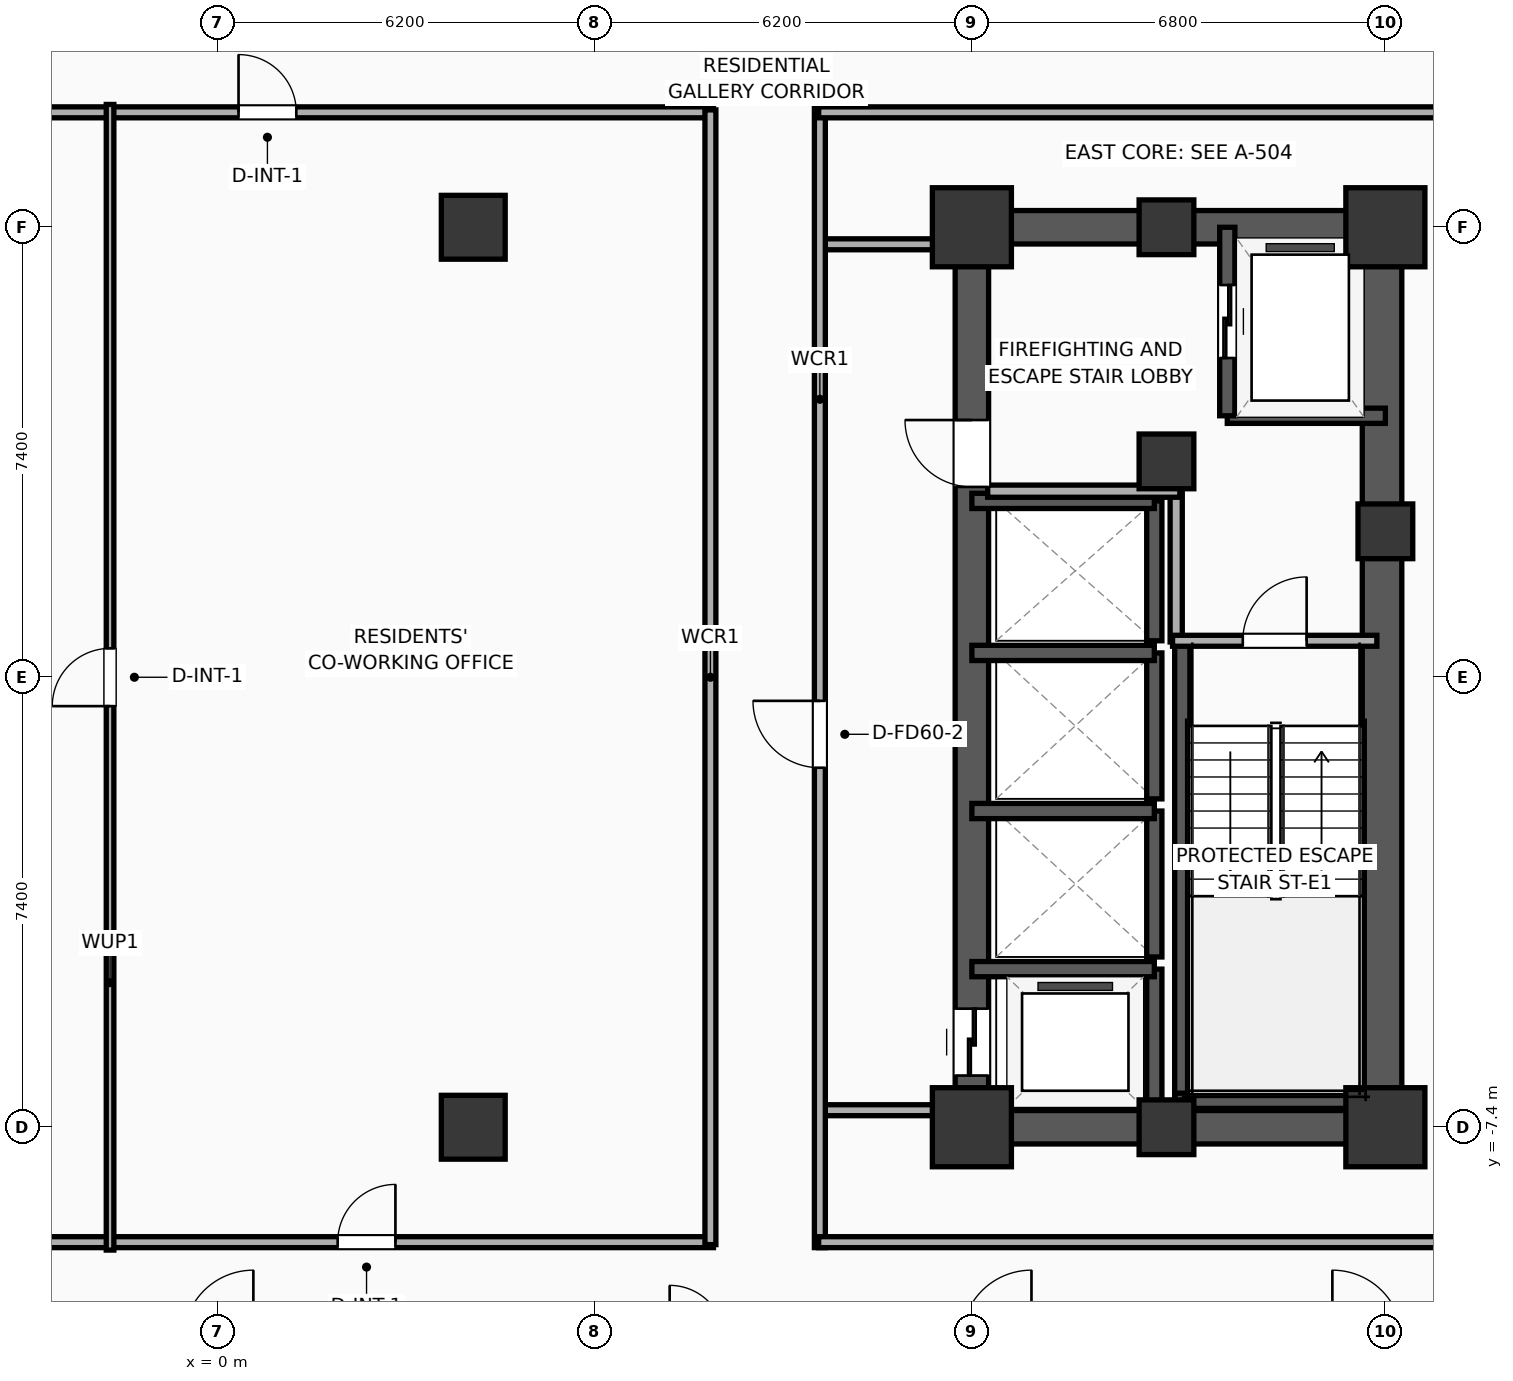
"""IFC4 building model, lengths in metres.
Left out: names, types, materials, properties, quantities, classifications, styles, units other than length and angle.
Written with IfcOpenShell. Run it as: python <this file> out.ifc"""

import sys

from ifc_helpers import new_model, si_unit, direction, frame, frame_2d, origin, origin_2d, place, context, subcontext, project, spatial, rectangle, extrude, element, fill, save


model = new_model("IFC4")
c1 = context("Model", 3, precision=1e-05, world=origin(), true_north=direction((0.0, 1.0)))
c2 = subcontext(c1, "Body", "Model", "MODEL_VIEW")
j1 = project(units=[si_unit("LENGTHUNIT", "METRE"), si_unit("PLANEANGLEUNIT", "RADIAN")], contexts=[c1])
p1 = place(None, origin())
s1 = spatial("IfcSite", under=j1, at=p1, CompositionType="ELEMENT")
p2 = place(p1, origin())
s2 = spatial("IfcBuilding", under=s1, at=p2, CompositionType="ELEMENT")
p3 = place(p2, frame((0.0, 0.0, 89.7)))
s3 = spatial("IfcBuildingStorey", under=s2, at=p3, CompositionType="ELEMENT", Elevation=89.7)
p4 = place(p3, frame((12.4, -7.4, 0.0), z_axis=(0.0, 0.0, 1.0), x_axis=(1.0, 0.0, 0.0)))
e1 = element("IfcColumn", 1, at=p4, inside=s3, PredefinedType="COLUMN", context=c2, shape_type="SweptSolid", body=[
    extrude(rectangle(XDim=1.3, YDim=1.3, at=origin_2d()), origin(), (0.0, 0.0, 1.0), 3.9),
])
p5 = place(p3, frame((15.6, 3.55, 0.0), z_axis=(0.0, 0.0, 1.0), x_axis=(1.0, 0.0, 0.0)))
e2 = element("IfcColumn", 2, at=p5, inside=s3, PredefinedType="COLUMN", context=c2, shape_type="SweptSolid", body=[
    extrude(rectangle(XDim=0.9, YDim=0.9, at=origin_2d()), origin(), (0.0, 0.0, 1.0), 3.9),
])
p6 = place(p3, frame((12.4, 7.4, 0.0), z_axis=(0.0, 0.0, 1.0), x_axis=(1.0, 0.0, 0.0)))
e3 = element("IfcColumn", 3, at=p6, inside=s3, PredefinedType="COLUMN", context=c2, shape_type="SweptSolid", body=[
    extrude(rectangle(XDim=1.3, YDim=1.3, at=origin_2d()), origin(), (0.0, 0.0, 1.0), 3.9),
])
for number, where, z_axis, x_axis in (
    (4, (15.6, -7.4, 0.0), (0.0, 0.0, 1.0), (1.0, 0.0, 0.0)),
    (5, (15.6, 7.4, 0.0), (0.0, 0.0, 1.0), (1.0, 0.0, 0.0)),
):
    element("IfcColumn", number, at=place(p3, frame(where, z_axis=z_axis, x_axis=x_axis)), inside=s3, PredefinedType="COLUMN", context=c2, shape_type="SweptSolid", body=[
        extrude(rectangle(XDim=0.9, YDim=0.9, at=origin_2d()), origin(), (0.0, 0.0, 1.0), 3.9),
    ])
p7 = place(p3, frame((19.2, -7.4, 0.0), z_axis=(0.0, 0.0, 1.0), x_axis=(1.0, 0.0, 0.0)))
e6 = element("IfcColumn", 6, at=p7, inside=s3, PredefinedType="COLUMN", context=c2, shape_type="SweptSolid", body=[
    extrude(rectangle(XDim=1.3, YDim=1.3, at=origin_2d()), origin(), (0.0, 0.0, 1.0), 3.9),
])
p8 = place(p3, frame((19.2, 2.4, 0.0), z_axis=(0.0, 0.0, 1.0), x_axis=(1.0, 0.0, 0.0)))
e7 = element("IfcColumn", 7, at=p8, inside=s3, PredefinedType="COLUMN", context=c2, shape_type="SweptSolid", body=[
    extrude(rectangle(XDim=0.9, YDim=0.9, at=origin_2d()), origin(), (0.0, 0.0, 1.0), 3.9),
])
p9 = place(p3, frame((19.2, 7.4, 0.0), z_axis=(0.0, 0.0, 1.0), x_axis=(1.0, 0.0, 0.0)))
e8 = element("IfcColumn", 8, at=p9, inside=s3, PredefinedType="COLUMN", context=c2, shape_type="SweptSolid", body=[
    extrude(rectangle(XDim=1.3, YDim=1.3, at=origin_2d()), origin(), (0.0, 0.0, 1.0), 3.9),
])
for number, where, z_axis, x_axis in (
    (9, (12.125, -7.4, 0.0), (0.0, 0.0, 1.0), (1.0, 0.0, 0.0)),
    (10, (12.125, 7.4, 0.0), (0.0, 0.0, 1.0), (1.0, 0.0, 0.0)),
):
    element("IfcWall", number, at=place(p3, frame(where, z_axis=z_axis, x_axis=x_axis)), inside=s3, PredefinedType="SHEAR", context=c2, shape_type="SweptSolid", body=[
        extrude(rectangle(XDim=7.35, YDim=0.55, at=frame_2d((3.675, 0.0))), origin(), (0.0, 0.0, 1.0), 3.65),
    ])
p10 = place(p3, frame((12.4, -7.4, 0.0), z_axis=(0.0, 0.0, 1.0), x_axis=(0.0, 1.0, 0.0)))
e11 = element("IfcWall", 11, at=p10, inside=s3, PredefinedType="SHEAR", context=c2, shape_type="SweptSolid", body=[
    extrude(rectangle(XDim=14.8, YDim=0.55, at=frame_2d((7.4, 0.0))), origin(), (0.0, 0.0, 1.0), 3.65),
])
p11 = place(p10, frame((0.85, 0.0, 0.0)))
e12 = element("IfcOpeningElement", 12, at=p11, cuts=e11, PredefinedType="OPENING", context=c2, shape_type="SweptSolid", body=[
    extrude(rectangle(XDim=1.1, YDim=2.05, at=frame_2d((0.55, 1.025))), frame((0.0, 0.285, 0.0), z_axis=(0.0, -1.0, 0.0), x_axis=(1.0, 0.0, 0.0)), (0.0, 0.0, 1.0), 0.57),
])
p12 = place(p10, frame((10.53, 0.0, 0.0)))
e13 = element("IfcOpeningElement", 13, at=p12, cuts=e11, PredefinedType="OPENING", context=c2, shape_type="SweptSolid", body=[
    extrude(rectangle(XDim=1.1, YDim=2.05, at=frame_2d((0.55, 1.025))), frame((0.0, 0.285, 0.0), z_axis=(0.0, -1.0, 0.0), x_axis=(1.0, 0.0, 0.0)), (0.0, 0.0, 1.0), 0.57),
])
p13 = place(p3, frame((19.145, -7.4, 0.0), z_axis=(0.0, 0.0, 1.0), x_axis=(0.0, 1.0, 0.0)))
e14 = element("IfcWall", 14, at=p13, inside=s3, PredefinedType="SHEAR", context=c2, shape_type="SweptSolid", body=[
    extrude(rectangle(XDim=14.8, YDim=0.65, at=frame_2d((7.4, 0.0))), origin(), (0.0, 0.0, 1.0), 3.65),
])
p14 = place(p3, frame((15.86, -7.085, 0.0), z_axis=(0.0, 0.0, 1.0), x_axis=(0.0, 1.0, 0.0)))
e15 = element("IfcWall", 15, at=p14, inside=s3, PredefinedType="SOLIDWALL", context=c2, shape_type="SweptSolid", body=[
    extrude(rectangle(XDim=7.685, YDim=0.25, at=frame_2d((3.843, 0.0))), origin(), (0.0, 0.0, 1.0), 3.65),
])
p15 = place(p3, frame((15.74, -6.965, 0.0), z_axis=(0.0, 0.0, 1.0), x_axis=(1.0, 0.0, 0.0)))
e16 = element("IfcWall", 16, at=p15, inside=s3, PredefinedType="SOLIDWALL", context=c2, shape_type="SweptSolid", body=[
    extrude(rectangle(XDim=3.46, YDim=0.25, at=frame_2d((1.73, 0.0))), origin(), (0.0, 0.0, 1.0), 3.65),
])
for number, where, z_axis, x_axis in (
    (17, (4.2, -7.4, 0.0), (0.0, 0.0, 1.0), (1.0, 0.0, 0.0)),
    (18, (4.2, 7.4, 0.0), (0.0, 0.0, 1.0), (1.0, 0.0, 0.0)),
):
    element("IfcColumn", number, at=place(p3, frame(where, z_axis=z_axis, x_axis=x_axis)), inside=s3, PredefinedType="COLUMN", context=c2, shape_type="SweptSolid", body=[
        extrude(rectangle(XDim=1.05, YDim=1.05, at=origin_2d()), origin(), (0.0, 0.0, 1.0), 3.9),
    ])
p16 = place(p3, frame((16.6, 4.3, 0.0), z_axis=(0.0, 0.0, 1.0), x_axis=(1.0, 0.0, 0.0)))
e19 = element("IfcWall", 19, at=p16, inside=s3, PredefinedType="SOLIDWALL", context=c2, shape_type="SweptSolid", body=[
    extrude(rectangle(XDim=2.6, YDim=0.25, at=frame_2d((1.3, 0.0))), origin(), (0.0, 0.0, 1.0), 3.65),
])
p17 = place(p3, frame((16.6, 7.4, 0.0), z_axis=(0.0, 0.0, 1.0), x_axis=(0.0, -1.0, 0.0)))
e20 = element("IfcWall", 20, at=p17, inside=s3, PredefinedType="SOLIDWALL", context=c2, shape_type="SweptSolid", body=[
    extrude(rectangle(XDim=3.1, YDim=0.25, at=frame_2d((1.55, 0.0))), origin(), (0.0, 0.0, 1.0), 3.65),
])
p18 = place(p17, frame((0.95, 0.0, 0.0)))
e21 = element("IfcOpeningElement", 21, at=p18, cuts=e20, PredefinedType="OPENING", context=c2, shape_type="SweptSolid", body=[
    extrude(rectangle(XDim=1.2, YDim=2.05, at=frame_2d((0.6, 1.025))), frame((0.0, 0.135, 0.0), z_axis=(0.0, -1.0, 0.0), x_axis=(1.0, 0.0, 0.0)), (0.0, 0.0, 1.0), 0.27),
])
p19 = place(p3, frame((15.4, -7.4, 0.0), z_axis=(0.0, 0.0, 1.0), x_axis=(0.0, 1.0, 0.0)))
e22 = element("IfcWall", 22, at=p19, inside=s3, PredefinedType="SOLIDWALL", context=c2, shape_type="SweptSolid", body=[
    extrude(rectangle(XDim=2.6, YDim=0.25, at=frame_2d((1.3, 0.0))), origin(), (0.0, 0.0, 1.0), 3.65),
])
p20 = place(p3, frame((15.4, -4.8, 0.0), z_axis=(0.0, 0.0, 1.0), x_axis=(-1.0, 0.0, 0.0)))
e23 = element("IfcWall", 23, at=p20, inside=s3, PredefinedType="SOLIDWALL", context=c2, shape_type="SweptSolid", body=[
    extrude(rectangle(XDim=3.0, YDim=0.25, at=frame_2d((1.5, 0.0))), origin(), (0.0, 0.0, 1.0), 3.65),
])
p21 = place(p3, frame((15.4, -4.6, 0.0), z_axis=(0.0, 0.0, 1.0), x_axis=(0.0, 1.0, 0.0)))
e24 = element("IfcWall", 24, at=p21, inside=s3, PredefinedType="SOLIDWALL", context=c2, shape_type="SweptSolid", body=[
    extrude(rectangle(XDim=2.4, YDim=0.25, at=frame_2d((1.2, 0.0))), origin(), (0.0, 0.0, 1.0), 3.65),
])
p22 = place(p3, frame((15.4, -2.2, 0.0), z_axis=(0.0, 0.0, 1.0), x_axis=(-1.0, 0.0, 0.0)))
e25 = element("IfcWall", 25, at=p22, inside=s3, PredefinedType="SOLIDWALL", context=c2, shape_type="SweptSolid", body=[
    extrude(rectangle(XDim=3.0, YDim=0.25, at=frame_2d((1.5, 0.0))), origin(), (0.0, 0.0, 1.0), 3.65),
])
p23 = place(p3, frame((15.4, -2.0, 0.0), z_axis=(0.0, 0.0, 1.0), x_axis=(0.0, 1.0, 0.0)))
e26 = element("IfcWall", 26, at=p23, inside=s3, PredefinedType="SOLIDWALL", context=c2, shape_type="SweptSolid", body=[
    extrude(rectangle(XDim=2.4, YDim=0.25, at=frame_2d((1.2, 0.0))), origin(), (0.0, 0.0, 1.0), 3.65),
])
p24 = place(p3, frame((15.4, 0.4, 0.0), z_axis=(0.0, 0.0, 1.0), x_axis=(-1.0, 0.0, 0.0)))
e27 = element("IfcWall", 27, at=p24, inside=s3, PredefinedType="SOLIDWALL", context=c2, shape_type="SweptSolid", body=[
    extrude(rectangle(XDim=3.0, YDim=0.25, at=frame_2d((1.5, 0.0))), origin(), (0.0, 0.0, 1.0), 3.65),
])
p25 = place(p3, frame((15.4, 0.6, 0.0), z_axis=(0.0, 0.0, 1.0), x_axis=(0.0, 1.0, 0.0)))
e28 = element("IfcWall", 28, at=p25, inside=s3, PredefinedType="SOLIDWALL", context=c2, shape_type="SweptSolid", body=[
    extrude(rectangle(XDim=2.3, YDim=0.25, at=frame_2d((1.15, 0.0))), origin(), (0.0, 0.0, 1.0), 3.65),
])
p26 = place(p3, frame((15.4, 2.9, 0.0), z_axis=(0.0, 0.0, 1.0), x_axis=(-1.0, 0.0, 0.0)))
e29 = element("IfcWall", 29, at=p26, inside=s3, PredefinedType="SOLIDWALL", context=c2, shape_type="SweptSolid", body=[
    extrude(rectangle(XDim=3.0, YDim=0.25, at=frame_2d((1.5, 0.0))), origin(), (0.0, 0.0, 1.0), 3.65),
])
p27 = place(p3, frame((15.76, 0.58, 0.0), z_axis=(0.0, 0.0, 1.0), x_axis=(0.0, 1.0, 0.0)))
e30 = element("IfcWall", 30, at=p27, inside=s3, PredefinedType="PARTITIONING", context=c2, shape_type="SweptSolid", body=[
    extrude(rectangle(XDim=2.52, YDim=0.2, at=frame_2d((1.26, 0.0))), origin(), (0.0, 0.0, 1.0), 3.65),
])
p28 = place(p3, frame((12.66, 3.06, 0.0), z_axis=(0.0, 0.0, 1.0), x_axis=(1.0, 0.0, 0.0)))
e31 = element("IfcWall", 31, at=p28, inside=s3, PredefinedType="PARTITIONING", context=c2, shape_type="SweptSolid", body=[
    extrude(rectangle(XDim=3.16, YDim=0.2, at=frame_2d((1.58, 0.0))), origin(), (0.0, 0.0, 1.0), 3.65),
])
p29 = place(p3, frame((15.7, 0.6, 0.0), z_axis=(0.0, 0.0, 1.0), x_axis=(1.0, 0.0, 0.0)))
e32 = element("IfcWall", 32, at=p29, inside=s3, PredefinedType="PARTITIONING", context=c2, shape_type="SweptSolid", body=[
    extrude(rectangle(XDim=3.36, YDim=0.18, at=frame_2d((1.68, 0.0))), origin(), (0.0, 0.0, 1.0), 3.65),
])
p30 = place(p29, frame((1.155, 0.0, 0.0)))
e33 = element("IfcOpeningElement", 33, at=p30, cuts=e32, PredefinedType="OPENING", context=c2, shape_type="SweptSolid", body=[
    extrude(rectangle(XDim=1.05, YDim=2.05, at=frame_2d((0.525, 1.025))), frame((0.0, 0.1, 0.0), z_axis=(0.0, -1.0, 0.0), x_axis=(1.0, 0.0, 0.0)), (0.0, 0.0, 1.0), 0.2),
])
for number, where, z_axis, x_axis in (
    (34, (9.88, 7.12, 0.0), (0.0, 0.0, 1.0), (1.0, 0.0, 0.0)),
    (35, (9.88, -7.12, 0.0), (0.0, 0.0, 1.0), (1.0, 0.0, 0.0)),
):
    element("IfcWall", number, at=place(p3, frame(where, z_axis=z_axis, x_axis=x_axis)), inside=s3, PredefinedType="PARTITIONING", context=c2, shape_type="SweptSolid", body=[
        extrude(rectangle(XDim=2.27, YDim=0.18, at=frame_2d((1.135, 0.0))), origin(), (0.0, 0.0, 1.0), 3.65),
    ])
p31 = place(p3, frame((9.9, -9.38, 0.0), z_axis=(0.0, 0.0, 1.0), x_axis=(0.0, 1.0, 0.0)))
e36 = element("IfcWall", 36, at=p31, inside=s3, PredefinedType="PARTITIONING", context=c2, shape_type="SweptSolid", body=[
    extrude(rectangle(XDim=18.76, YDim=0.18, at=frame_2d((9.38, 0.0))), origin(), (0.0, 0.0, 1.0), 3.65),
])
p32 = place(p31, frame((7.892, 0.0, 0.0)))
e37 = element("IfcOpeningElement", 37, at=p32, cuts=e36, PredefinedType="OPENING", context=c2, shape_type="SweptSolid", body=[
    extrude(rectangle(XDim=1.1, YDim=2.05, at=frame_2d((0.55, 1.025))), frame((0.0, 0.1, 0.0), z_axis=(0.0, -1.0, 0.0), x_axis=(1.0, 0.0, 0.0)), (0.0, 0.0, 1.0), 0.2),
])
p33 = place(p3, frame((9.88, 9.29, 0.0), z_axis=(0.0, 0.0, 1.0), x_axis=(1.0, 0.0, 0.0)))
e38 = element("IfcWall", 38, at=p33, inside=s3, PredefinedType="PARTITIONING", context=c2, shape_type="SweptSolid", body=[
    extrude(rectangle(XDim=23.33, YDim=0.18, at=frame_2d((11.665, 0.0))), origin(), (0.0, 0.0, 1.0), 3.65),
])
p34 = place(p33, frame((17.59, 0.0, 0.0)))
e39 = element("IfcOpeningElement", 39, at=p34, cuts=e38, PredefinedType="OPENING", context=c2, shape_type="SweptSolid", body=[
    extrude(rectangle(XDim=1.15, YDim=2.05, at=frame_2d((0.575, 1.025))), frame((0.0, 0.1, 0.0), z_axis=(0.0, -1.0, 0.0), x_axis=(1.0, 0.0, 0.0)), (0.0, 0.0, 1.0), 0.2),
])
p35 = place(p3, frame((9.88, -9.29, 0.0), z_axis=(0.0, 0.0, 1.0), x_axis=(1.0, 0.0, 0.0)))
e40 = element("IfcWall", 40, at=p35, inside=s3, PredefinedType="PARTITIONING", context=c2, shape_type="SweptSolid", body=[
    extrude(rectangle(XDim=23.33, YDim=0.18, at=frame_2d((11.665, 0.0))), origin(), (0.0, 0.0, 1.0), 3.65),
])
p36 = place(p3, frame((-8.15, 9.29, 0.0), z_axis=(0.0, 0.0, 1.0), x_axis=(1.0, 0.0, 0.0)))
e41 = element("IfcWall", 41, at=p36, inside=s3, PredefinedType="PARTITIONING", context=c2, shape_type="SweptSolid", body=[
    extrude(rectangle(XDim=16.3, YDim=0.18, at=frame_2d((8.15, 0.0))), origin(), (0.0, 0.0, 1.0), 3.65),
])
p37 = place(p36, frame((8.49, 0.0, 0.0)))
e42 = element("IfcOpeningElement", 42, at=p37, cuts=e41, PredefinedType="OPENING", context=c2, shape_type="SweptSolid", body=[
    extrude(rectangle(XDim=0.95, YDim=2.05, at=frame_2d((0.475, 1.025))), frame((0.0, 0.1, 0.0), z_axis=(0.0, -1.0, 0.0), x_axis=(1.0, 0.0, 0.0)), (0.0, 0.0, 1.0), 0.2),
])
p38 = place(p3, frame((-8.15, -9.29, 0.0), z_axis=(0.0, 0.0, 1.0), x_axis=(1.0, 0.0, 0.0)))
e43 = element("IfcWall", 43, at=p38, inside=s3, PredefinedType="PARTITIONING", context=c2, shape_type="SweptSolid", body=[
    extrude(rectangle(XDim=16.3, YDim=0.18, at=frame_2d((8.15, 0.0))), origin(), (0.0, 0.0, 1.0), 3.65),
])
p39 = place(p38, frame((1.13, 0.0, 0.0)))
e44 = element("IfcOpeningElement", 44, at=p39, cuts=e43, PredefinedType="OPENING", context=c2, shape_type="SweptSolid", body=[
    extrude(rectangle(XDim=1.0, YDim=2.05, at=frame_2d((0.5, 1.025))), frame((0.0, 0.1, 0.0), z_axis=(0.0, -1.0, 0.0), x_axis=(1.0, 0.0, 0.0)), (0.0, 0.0, 1.0), 0.2),
])
p40 = place(p38, frame((10.12, 0.0, 0.0)))
e45 = element("IfcOpeningElement", 45, at=p40, cuts=e43, PredefinedType="OPENING", context=c2, shape_type="SweptSolid", body=[
    extrude(rectangle(XDim=0.95, YDim=2.05, at=frame_2d((0.475, 1.025))), frame((0.0, 0.1, 0.0), z_axis=(0.0, -1.0, 0.0), x_axis=(1.0, 0.0, 0.0)), (0.0, 0.0, 1.0), 0.2),
])
p41 = place(p3, frame((8.1, -9.33, 0.0), z_axis=(0.0, 0.0, 1.0), x_axis=(0.0, 1.0, 0.0)))
e46 = element("IfcWall", 46, at=p41, inside=s3, PredefinedType="PARTITIONING", context=c2, shape_type="SweptSolid", body=[
    extrude(rectangle(XDim=18.66, YDim=0.18, at=frame_2d((9.33, 0.0))), origin(), (0.0, 0.0, 1.0), 3.65),
])
p42 = place(p3, frame((-1.773, -9.42, 0.0), z_axis=(0.0, 0.0, 1.0), x_axis=(0.0, 1.0, 0.0)))
e47 = element("IfcWall", 47, at=p42, inside=s3, PredefinedType="PARTITIONING", context=c2, shape_type="SweptSolid", body=[
    extrude(rectangle(XDim=18.84, YDim=0.125, at=frame_2d((9.42, 0.0))), origin(), (0.0, 0.0, 1.0), 3.65),
])
p43 = place(p42, frame((8.945, 0.0, 0.0)))
e48 = element("IfcOpeningElement", 48, at=p43, cuts=e47, PredefinedType="OPENING", context=c2, shape_type="SweptSolid", body=[
    extrude(rectangle(XDim=0.95, YDim=2.05, at=frame_2d((0.475, 1.025))), frame((0.0, 0.073, 0.0), z_axis=(0.0, -1.0, 0.0), x_axis=(1.0, 0.0, 0.0)), (0.0, 0.0, 1.0), 0.145),
])
p44 = place(p18, origin())
e49 = element("IfcDoor", 49, at=p44, inside=s3, OperationType="SLIDING_TO_LEFT", PredefinedType="DOOR", context=c2, shape_type="SweptSolid", body=[
    extrude(rectangle(XDim=1.2, YDim=2.05, at=frame_2d((0.6, 1.025))), frame((0.0, 0.025, 0.0), z_axis=(0.0, -1.0, 0.0), x_axis=(1.0, 0.0, 0.0)), (0.0, 0.0, 1.0), 0.05),
])
fill(e21, e49)
p45 = place(p11, origin())
e50 = element("IfcDoor", 50, at=p45, inside=s3, OperationType="SLIDING_TO_LEFT", PredefinedType="DOOR", context=c2, shape_type="SweptSolid", body=[
    extrude(rectangle(XDim=1.1, YDim=2.05, at=frame_2d((0.55, 1.025))), frame((0.0, 0.025, 0.0), z_axis=(0.0, -1.0, 0.0), x_axis=(1.0, 0.0, 0.0)), (0.0, 0.0, 1.0), 0.05),
])
fill(e12, e50)
p46 = place(p30, origin())
e51 = element("IfcDoor", 51, at=p46, inside=s3, OperationType="SINGLE_SWING_RIGHT", PredefinedType="DOOR", context=c2, shape_type="SweptSolid", body=[
    extrude(rectangle(XDim=1.05, YDim=2.05, at=frame_2d((0.525, 1.025))), frame((0.0, 0.025, 0.0), z_axis=(0.0, -1.0, 0.0), x_axis=(1.0, 0.0, 0.0)), (0.0, 0.0, 1.0), 0.05),
])
fill(e33, e51)
p47 = place(p32, origin())
e52 = element("IfcDoor", 52, at=p47, inside=s3, OperationType="SINGLE_SWING_RIGHT", PredefinedType="DOOR", context=c2, shape_type="SweptSolid", body=[
    extrude(rectangle(XDim=1.1, YDim=2.05, at=frame_2d((0.55, 1.025))), frame((0.0, 0.025, 0.0), z_axis=(0.0, -1.0, 0.0), x_axis=(1.0, 0.0, 0.0)), (0.0, 0.0, 1.0), 0.05),
])
fill(e37, e52)
p48 = place(p37, origin())
e53 = element("IfcDoor", 53, at=p48, inside=s3, OperationType="SINGLE_SWING_LEFT", PredefinedType="DOOR", context=c2, shape_type="SweptSolid", body=[
    extrude(rectangle(XDim=0.95, YDim=2.05, at=frame_2d((0.475, 1.025))), frame((0.0, 0.025, 0.0), z_axis=(0.0, -1.0, 0.0), x_axis=(1.0, 0.0, 0.0)), (0.0, 0.0, 1.0), 0.05),
])
fill(e42, e53)
p49 = place(p40, origin())
e54 = element("IfcDoor", 54, at=p49, inside=s3, OperationType="SINGLE_SWING_RIGHT", PredefinedType="DOOR", context=c2, shape_type="SweptSolid", body=[
    extrude(rectangle(XDim=0.95, YDim=2.05, at=frame_2d((0.475, 1.025))), frame((0.0, 0.025, 0.0), z_axis=(0.0, -1.0, 0.0), x_axis=(1.0, 0.0, 0.0)), (0.0, 0.0, 1.0), 0.05),
])
fill(e45, e54)
p50 = place(p43, origin())
e55 = element("IfcDoor", 55, at=p50, inside=s3, OperationType="SINGLE_SWING_LEFT", PredefinedType="DOOR", context=c2, shape_type="SweptSolid", body=[
    extrude(rectangle(XDim=0.95, YDim=2.05, at=frame_2d((0.475, 1.025))), frame((0.0, 0.025, 0.0), z_axis=(0.0, -1.0, 0.0), x_axis=(1.0, 0.0, 0.0)), (0.0, 0.0, 1.0), 0.05),
])
fill(e48, e55)
p51 = place(p12, origin())
e56 = element("IfcDoor", 56, at=p51, inside=s3, OperationType="SINGLE_SWING_RIGHT", PredefinedType="DOOR", context=c2, shape_type="SweptSolid", body=[
    extrude(rectangle(XDim=1.1, YDim=2.05, at=frame_2d((0.55, 1.025))), frame((0.0, 0.025, 0.0), z_axis=(0.0, -1.0, 0.0), x_axis=(1.0, 0.0, 0.0)), (0.0, 0.0, 1.0), 0.05),
])
fill(e13, e56)
save(model, sys.argv[1])
